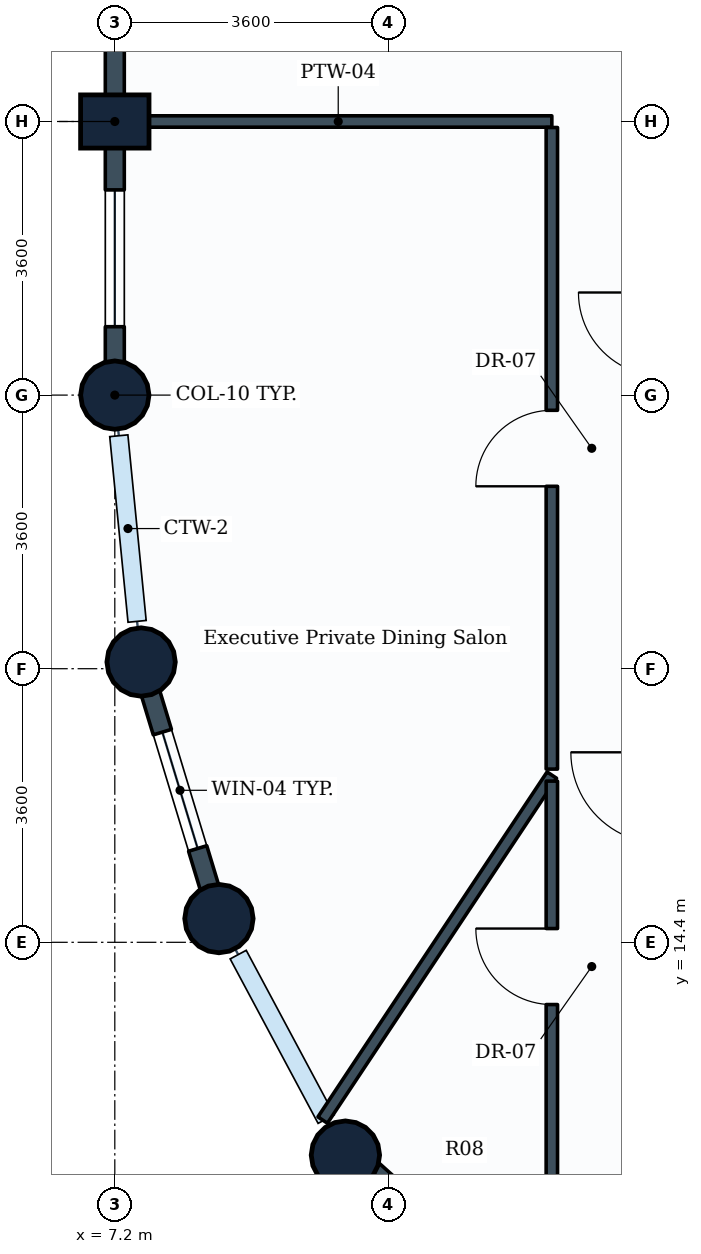
"""IFC4 building model, lengths in metres.
Left out: names, types, materials, properties, quantities, classifications, styles, units other than length and angle.
Written with IfcOpenShell. Run it as: python <this file> out.ifc"""

import sys

from ifc_helpers import new_model, si_unit, direction, frame, frame_2d, origin, origin_2d, place, context, subcontext, project, spatial, rectangle, circle, extrude, element, fill, save


model = new_model("IFC4")
c1 = context("Model", 3, precision=1e-05, world=origin(), true_north=direction((0.0, 1.0)))
c2 = subcontext(c1, "Body", "Model", "MODEL_VIEW")
j1 = project(units=[si_unit("LENGTHUNIT", "METRE"), si_unit("PLANEANGLEUNIT", "RADIAN")], contexts=[c1])
p1 = place(None, origin())
s1 = spatial("IfcSite", under=j1, at=p1, CompositionType="ELEMENT")
p2 = place(p1, origin())
s2 = spatial("IfcBuilding", under=s1, at=p2, CompositionType="ELEMENT")
p3 = place(p2, frame((0.0, 0.0, 205.2)))
s3 = spatial("IfcBuildingStorey", under=s2, at=p3, CompositionType="ELEMENT", Elevation=205.2)
p4 = place(p3, frame((7.2, 21.6, 0.0), z_axis=(0.0, 0.0, 1.0), x_axis=(1.0, 0.0, 0.0)))
e1 = element("IfcColumn", 1, at=p4, inside=s3, PredefinedType="COLUMN", context=c2, shape_type="SweptSolid", body=[
    extrude(circle(Radius=0.45, at=origin_2d()), origin(), (0.0, 0.0, 1.0), 3.8),
])
p5 = place(p3, frame((7.2, 25.2, 0.0), z_axis=(0.0, 0.0, 1.0), x_axis=(0.0, 1.0, 0.0)))
e2 = element("IfcColumn", 2, at=p5, inside=s3, PredefinedType="COLUMN", context=c2, shape_type="SweptSolid", body=[
    extrude(rectangle(XDim=0.7, YDim=0.9, at=origin_2d()), origin(), (0.0, 0.0, 1.0), 3.8),
])
for number, where, z_axis, x_axis in (
    (3, (7.546, 18.088, 0.0), (0.0, 0.0, 1.0), (1.0, 0.0, 0.0)),
    (4, (8.57, 14.712, 0.0), (0.0, 0.0, 1.0), (1.0, 0.0, 0.0)),
    (5, (10.234, 11.6, 0.0), (0.0, 0.0, 1.0), (1.0, 0.0, 0.0)),
):
    element("IfcColumn", number, at=place(p3, frame(where, z_axis=z_axis, x_axis=x_axis)), inside=s3, PredefinedType="COLUMN", context=c2, shape_type="SweptSolid", body=[
        extrude(circle(Radius=0.45, at=origin_2d()), origin(), (0.0, 0.0, 1.0), 3.8),
    ])
p6 = place(p3, frame((7.2, 25.2, 0.0), z_axis=(0.0, 0.0, 1.0), x_axis=(0.0, 1.0, 0.0)))
e6 = element("IfcWall", 6, at=p6, inside=s3, PredefinedType="STANDARD", context=c2, shape_type="SweptSolid", body=[
    extrude(rectangle(XDim=3.6, YDim=0.25, at=frame_2d((1.8, 0.0))), origin(), (0.0, 0.0, 1.0), 2.93),
])
p7 = place(p3, frame((7.2, 21.6, 0.0), z_axis=(0.0, 0.0, 1.0), x_axis=(0.0, 1.0, 0.0)))
e7 = element("IfcWall", 7, at=p7, inside=s3, PredefinedType="STANDARD", context=c2, shape_type="SweptSolid", body=[
    extrude(rectangle(XDim=3.6, YDim=0.25, at=frame_2d((1.8, 0.0))), origin(), (0.0, 0.0, 1.0), 2.93),
])
p8 = place(p7, frame((0.9, 0.0, 0.85)))
e8 = element("IfcOpeningElement", 8, at=p8, cuts=e7, PredefinedType="OPENING", context=c2, shape_type="SweptSolid", body=[
    extrude(rectangle(XDim=1.8, YDim=1.35, at=frame_2d((0.9, 0.675))), frame((0.0, 0.135, 0.0), z_axis=(0.0, -1.0, 0.0), x_axis=(1.0, 0.0, 0.0)), (0.0, 0.0, 1.0), 0.27),
])
p9 = place(p3, frame((8.57, 14.712, 0.0), z_axis=(0.0, 0.0, 1.0), x_axis=(-0.290305086481, 0.956934144423, 0.0)))
e9 = element("IfcWall", 9, at=p9, inside=s3, PredefinedType="STANDARD", context=c2, shape_type="SweptSolid", body=[
    extrude(rectangle(XDim=3.528, YDim=0.25, at=frame_2d((1.764, 0.0))), origin(), (0.0, 0.0, 1.0), 2.93),
])
p10 = place(p9, frame((0.964, 0.0, 0.85)))
e10 = element("IfcOpeningElement", 10, at=p10, cuts=e9, PredefinedType="OPENING", context=c2, shape_type="SweptSolid", body=[
    extrude(rectangle(XDim=1.6, YDim=1.35, at=frame_2d((0.8, 0.675))), frame((0.0, 0.135, 0.0), z_axis=(0.0, -1.0, 0.0), x_axis=(1.0, 0.0, 0.0)), (0.0, 0.0, 1.0), 0.27),
])
p11 = place(p3, frame((12.472, 8.872, 0.0), z_axis=(0.0, 0.0, 1.0), x_axis=(-0.634258295121, 0.773121216285, 0.0)))
e11 = element("IfcWall", 11, at=p11, inside=s3, PredefinedType="STANDARD", context=c2, shape_type="SweptSolid", body=[
    extrude(rectangle(XDim=3.529, YDim=0.25, at=frame_2d((1.764, 0.0))), origin(), (0.0, 0.0, 1.0), 2.93),
])
p12 = place(p11, frame((0.964, 0.0, 0.85)))
e12 = element("IfcOpeningElement", 12, at=p12, cuts=e11, PredefinedType="OPENING", context=c2, shape_type="SweptSolid", body=[
    extrude(rectangle(XDim=1.6, YDim=1.35, at=frame_2d((0.8, 0.675))), frame((0.0, 0.135, 0.0), z_axis=(0.0, -1.0, 0.0), x_axis=(1.0, 0.0, 0.0)), (0.0, 0.0, 1.0), 0.27),
])
p13 = place(p3, frame((7.329, 25.2, 0.0), z_axis=(0.0, 0.0, 1.0), x_axis=(1.0, 0.0, 0.0)))
e13 = element("IfcWall", 13, at=p13, inside=s3, PredefinedType="PARTITIONING", context=c2, shape_type="SweptSolid", body=[
    extrude(rectangle(XDim=5.621, YDim=0.15, at=frame_2d((2.811, 0.0))), origin(), (0.0, 0.0, 1.0), 3.465),
])
p14 = place(p3, frame((12.95, 9.35, 0.0), z_axis=(0.0, 0.0, 1.0), x_axis=(-0.743647207073, 0.668572233504, 0.0)))
e14 = element("IfcWall", 14, at=p14, inside=s3, PredefinedType="PARTITIONING", context=c2, shape_type="SweptSolid", body=[
    extrude(rectangle(XDim=3.919, YDim=0.15, at=frame_2d((1.959, 0.0))), origin(), (0.0, 0.0, 1.0), 2.93),
])
p15 = place(p3, frame((12.95, 16.6, 0.0), z_axis=(0.0, 0.0, 1.0), x_axis=(-0.553282901055, -0.832993416181, 0.0)))
e15 = element("IfcWall", 15, at=p15, inside=s3, PredefinedType="PARTITIONING", context=c2, shape_type="SweptSolid", body=[
    extrude(rectangle(XDim=5.449, YDim=0.15, at=frame_2d((2.725, 0.0))), origin(), (0.0, 0.0, 1.0), 2.93),
])
p16 = place(p3, frame((12.95, 16.679, 0.0), z_axis=(0.0, 0.0, 1.0), x_axis=(0.0, 1.0, 0.0)))
e16 = element("IfcWall", 16, at=p16, inside=s3, PredefinedType="PARTITIONING", context=c2, shape_type="SweptSolid", body=[
    extrude(rectangle(XDim=8.442, YDim=0.15, at=frame_2d((4.221, 0.0))), origin(), (0.0, 0.0, 1.0), 3.19),
])
p17 = place(p16, frame((3.721, 0.0, 0.0)))
e17 = element("IfcOpeningElement", 17, at=p17, cuts=e16, PredefinedType="OPENING", context=c2, shape_type="SweptSolid", body=[
    extrude(rectangle(XDim=1.0, YDim=2.1, at=frame_2d((0.5, 1.05))), frame((0.0, 0.085, 0.0), z_axis=(0.0, -1.0, 0.0), x_axis=(1.0, 0.0, 0.0)), (0.0, 0.0, 1.0), 0.17),
])
p18 = place(p3, frame((12.95, 8.48, 0.0), z_axis=(0.0, 0.0, 1.0), x_axis=(0.0, 1.0, 0.0)))
e18 = element("IfcWall", 18, at=p18, inside=s3, PredefinedType="PARTITIONING", context=c2, shape_type="SweptSolid", body=[
    extrude(rectangle(XDim=8.041, YDim=0.15, at=frame_2d((4.021, 0.0))), origin(), (0.0, 0.0, 1.0), 2.93),
])
p19 = place(p18, frame((5.101, 0.0, 0.0)))
e19 = element("IfcOpeningElement", 19, at=p19, cuts=e18, PredefinedType="OPENING", context=c2, shape_type="SweptSolid", body=[
    extrude(rectangle(XDim=1.0, YDim=2.1, at=frame_2d((0.5, 1.05))), frame((0.0, 0.085, 0.0), z_axis=(0.0, -1.0, 0.0), x_axis=(1.0, 0.0, 0.0)), (0.0, 0.0, 1.0), 0.17),
])
p20 = place(p8, origin())
e20 = element("IfcWindow", 20, at=p20, inside=s3, PartitioningType="SINGLE_PANEL", PredefinedType="WINDOW", context=c2, shape_type="SweptSolid", body=[
    extrude(rectangle(XDim=1.8, YDim=1.35, at=frame_2d((0.9, 0.675))), frame((0.0, 0.03, 0.0), z_axis=(0.0, -1.0, 0.0), x_axis=(1.0, 0.0, 0.0)), (0.0, 0.0, 1.0), 0.06),
])
fill(e8, e20)
p21 = place(p10, origin())
e21 = element("IfcWindow", 21, at=p21, inside=s3, PartitioningType="SINGLE_PANEL", PredefinedType="WINDOW", context=c2, shape_type="SweptSolid", body=[
    extrude(rectangle(XDim=1.6, YDim=1.35, at=frame_2d((0.8, 0.675))), frame((0.0, 0.03, 0.0), z_axis=(0.0, -1.0, 0.0), x_axis=(1.0, 0.0, 0.0)), (0.0, 0.0, 1.0), 0.06),
])
fill(e10, e21)
p22 = place(p17, origin())
e22 = element("IfcDoor", 22, at=p22, inside=s3, OperationType="SINGLE_SWING_LEFT", PredefinedType="DOOR", context=c2, shape_type="SweptSolid", body=[
    extrude(rectangle(XDim=1.0, YDim=2.1, at=frame_2d((0.5, 1.05))), frame((0.0, 0.025, 0.0), z_axis=(0.0, -1.0, 0.0), x_axis=(1.0, 0.0, 0.0)), (0.0, 0.0, 1.0), 0.05),
])
fill(e17, e22)
p23 = place(p19, origin())
e23 = element("IfcDoor", 23, at=p23, inside=s3, OperationType="SINGLE_SWING_RIGHT", PredefinedType="DOOR", context=c2, shape_type="SweptSolid", body=[
    extrude(rectangle(XDim=1.0, YDim=2.1, at=frame_2d((0.5, 1.05))), frame((0.0, 0.025, 0.0), z_axis=(0.0, -1.0, 0.0), x_axis=(1.0, 0.0, 0.0)), (0.0, 0.0, 1.0), 0.05),
])
fill(e19, e23)
save(model, sys.argv[1])
